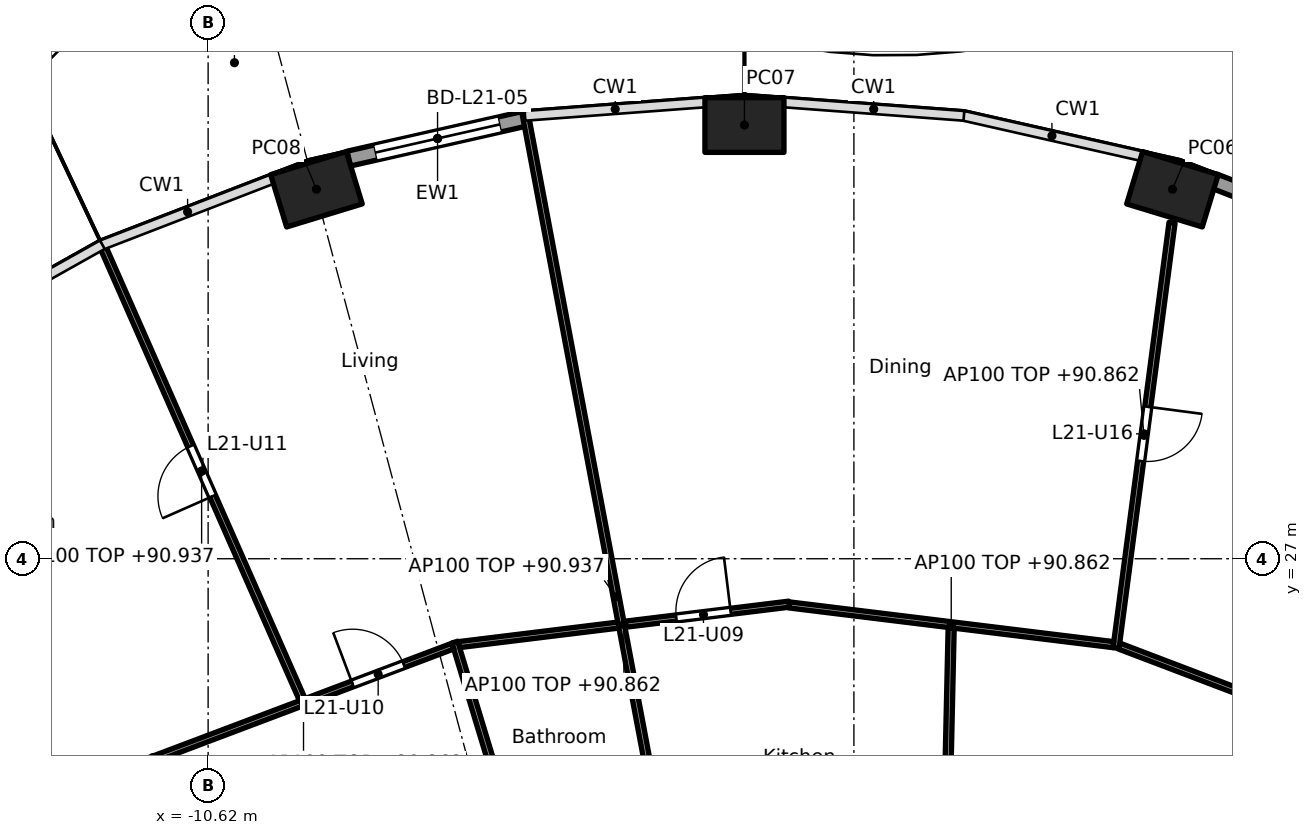
"""IFC4 building model, lengths in metres.
Left out: names, types, materials, properties, quantities, classifications, styles, units other than length and angle.
Written with IfcOpenShell. Run it as: python <this file> out.ifc"""

import sys

from ifc_helpers import new_model, si_unit, direction, frame, frame_2d, origin, origin_2d, place, context, subcontext, project, spatial, rectangle, hollow_rectangle, extrude, element, fill, save


model = new_model("IFC4")
c1 = context("Model", 3, precision=1e-05, world=origin(), true_north=direction((0.0, 1.0)))
c2 = subcontext(c1, "Body", "Model", "MODEL_VIEW")
j1 = project(units=[si_unit("LENGTHUNIT", "METRE"), si_unit("PLANEANGLEUNIT", "RADIAN")], contexts=[c1])
p1 = place(None, origin())
s1 = spatial("IfcSite", under=j1, at=p1, CompositionType="ELEMENT")
p2 = place(p1, origin())
s2 = spatial("IfcBuilding", under=s1, at=p2, CompositionType="ELEMENT")
p3 = place(p2, frame((0.0, 0.0, 88.1)))
s3 = spatial("IfcBuildingStorey", under=s2, at=p3, CompositionType="ELEMENT", Elevation=88.1)
for number, where, z_axis, x_axis in (
    (1, (5.239, 33.076, 0.0), (0.0, 0.0, 1.0), (-0.957, 0.292, 0.0)),
    (2, (-1.8, 34.133, 0.0), (0.0, 0.0, 1.0), (-1.0, 0.0, 0.0)),
    (3, (-8.839, 33.076, 0.0), (0.0, 0.0, 1.0), (-0.957, -0.292, 0.0)),
):
    element("IfcColumn", number, at=place(p3, frame(where, z_axis=z_axis, x_axis=x_axis)), inside=s3, PredefinedType="COLUMN", context=c2, shape_type="SweptSolid", body=[
        extrude(hollow_rectangle(XDim=1.3, YDim=0.9, WallThickness=0.045, at=origin_2d()), origin(), (0.0, 0.0, 1.0), 3.7),
    ])
p4 = place(p3, frame((5.929, 33.208, 0.0), z_axis=(0.0, 0.0, 1.0), x_axis=(0.932837560624, -0.360297218263, 0.0)))
e4 = element("IfcWall", 4, at=p4, inside=s3, PredefinedType="SOLIDWALL", context=c2, shape_type="SweptSolid", body=[
    extrude(rectangle(XDim=3.028, YDim=0.25, at=frame_2d((1.514, 0.0))), origin(), (0.0, 0.0, 1.0), 3.44),
])
p5 = place(p4, frame((0.464, 0.0, 0.0)))
e5 = element("IfcOpeningElement", 5, at=p5, cuts=e4, PredefinedType="OPENING", context=c2, shape_type="SweptSolid", body=[
    extrude(rectangle(XDim=2.1, YDim=2.4, at=frame_2d((1.05, 1.2))), frame((0.0, 0.135, 0.0), z_axis=(0.0, -1.0, 0.0), x_axis=(1.0, 0.0, 0.0)), (0.0, 0.0, 1.0), 0.27),
])
p6 = place(p3, frame((-8.306, 33.58, 0.0), z_axis=(0.0, 0.0, 1.0), x_axis=(0.975317607872, 0.220806620767, 0.0)))
e6 = element("IfcWall", 6, at=p6, inside=s3, PredefinedType="SOLIDWALL", context=c2, shape_type="SweptSolid", body=[
    extrude(rectangle(XDim=2.993, YDim=0.25, at=frame_2d((1.497, 0.0))), origin(), (0.0, 0.0, 1.0), 3.44),
])
p7 = place(p6, frame((0.447, 0.0, 0.0)))
e7 = element("IfcOpeningElement", 7, at=p7, cuts=e6, PredefinedType="OPENING", context=c2, shape_type="SweptSolid", body=[
    extrude(rectangle(XDim=2.1, YDim=2.4, at=frame_2d((1.05, 1.2))), frame((0.0, 0.135, 0.0), z_axis=(0.0, -1.0, 0.0), x_axis=(1.0, 0.0, 0.0)), (0.0, 0.0, 1.0), 0.27),
])
p8 = place(p3, frame((6.141, 14.829, 0.0), z_axis=(0.0, 0.0, 1.0), x_axis=(0.354477134193, 0.935064682968, 0.0)))
e8 = element("IfcWall", 8, at=p8, inside=s3, PredefinedType="PARTITIONING", context=c2, shape_type="SweptSolid", body=[
    extrude(rectangle(XDim=15.626, YDim=0.2, at=frame_2d((7.813, 0.0))), origin(), (0.0, 0.0, 1.0), 2.762),
])
p9 = place(p3, frame((9.379, 23.655, 0.0), z_axis=(0.0, 0.0, 1.0), x_axis=(-0.934613076136, 0.355666132653, 0.0)))
e9 = element("IfcWall", 9, at=p9, inside=s3, PredefinedType="PARTITIONING", context=c2, shape_type="SweptSolid", body=[
    extrude(rectangle(XDim=5.366, YDim=0.1, at=frame_2d((2.683, 0.0))), origin(), (0.0, 0.0, 1.0), 2.762),
])
p10 = place(p3, frame((4.311, 25.531, 0.0), z_axis=(0.0, 0.0, 1.0), x_axis=(0.130604008227, 0.991434613595, 0.0)))
e10 = element("IfcWall", 10, at=p10, inside=s3, PredefinedType="PARTITIONING", context=c2, shape_type="SweptSolid", body=[
    extrude(rectangle(XDim=7.055, YDim=0.1, at=frame_2d((3.527, 0.0))), origin(), (0.0, 0.0, 1.0), 2.762),
])
p11 = place(p10, frame((3.102, 0.0, 0.0)))
e11 = element("IfcOpeningElement", 11, at=p11, cuts=e10, PredefinedType="OPENING", context=c2, shape_type="SweptSolid", body=[
    extrude(rectangle(XDim=0.9, YDim=2.1, at=frame_2d((0.45, 1.05))), frame((0.0, 0.06, 0.0), z_axis=(0.0, -1.0, 0.0), x_axis=(1.0, 0.0, 0.0)), (0.0, 0.0, 1.0), 0.12),
])
p12 = place(p3, frame((4.267, 25.587, 0.0), z_axis=(0.0, 0.0, 1.0), x_axis=(-0.992576206119, 0.121624319302, 0.0)))
e12 = element("IfcWall", 12, at=p12, inside=s3, PredefinedType="PARTITIONING", context=c2, shape_type="SweptSolid", body=[
    extrude(rectangle(XDim=5.374, YDim=0.1, at=frame_2d((2.687, 0.0))), origin(), (0.0, 0.0, 1.0), 2.762),
])
p13 = place(p3, frame((1.303, 12.665, 0.0), z_axis=(0.0, 0.0, 1.0), x_axis=(0.022412244057, 0.999748814111, 0.0)))
e13 = element("IfcWall", 13, at=p13, inside=s3, PredefinedType="PARTITIONING", context=c2, shape_type="SweptSolid", body=[
    extrude(rectangle(XDim=13.203, YDim=0.1, at=frame_2d((6.601, 0.0))), origin(), (0.0, 0.0, 1.0), 2.687),
])
p14 = place(p13, frame((2.407, 0.0, 0.0)))
e14 = element("IfcOpeningElement", 14, at=p14, cuts=e13, PredefinedType="OPENING", context=c2, shape_type="SweptSolid", body=[
    extrude(rectangle(XDim=0.9, YDim=2.1, at=frame_2d((0.45, 1.05))), frame((0.0, 0.06, 0.0), z_axis=(0.0, -1.0, 0.0), x_axis=(1.0, 0.0, 0.0)), (0.0, 0.0, 1.0), 0.12),
])
p15 = place(p13, frame((9.009, 0.0, 0.0)))
e15 = element("IfcOpeningElement", 15, at=p15, cuts=e13, PredefinedType="OPENING", context=c2, shape_type="SweptSolid", body=[
    extrude(rectangle(XDim=0.9, YDim=2.1, at=frame_2d((0.45, 1.05))), frame((0.0, 0.06, 0.0), z_axis=(0.0, -1.0, 0.0), x_axis=(1.0, 0.0, 0.0)), (0.0, 0.0, 1.0), 0.12),
])
p16 = place(p3, frame((-1.066, 26.253, 0.0), z_axis=(0.0, 0.0, 1.0), x_axis=(-0.992574853421, -0.121635358166, 0.0)))
e16 = element("IfcWall", 16, at=p16, inside=s3, PredefinedType="PARTITIONING", context=c2, shape_type="SweptSolid", body=[
    extrude(rectangle(XDim=5.473, YDim=0.1, at=frame_2d((2.737, 0.0))), origin(), (0.0, 0.0, 1.0), 2.762),
])
p17 = place(p16, frame((0.969, 0.0, 0.0)))
e17 = element("IfcOpeningElement", 17, at=p17, cuts=e16, PredefinedType="OPENING", context=c2, shape_type="SweptSolid", body=[
    extrude(rectangle(XDim=0.9, YDim=2.1, at=frame_2d((0.45, 1.05))), frame((0.0, 0.06, 0.0), z_axis=(0.0, -1.0, 0.0), x_axis=(1.0, 0.0, 0.0)), (0.0, 0.0, 1.0), 0.12),
])
p18 = place(p3, frame((-2.413, 18.427, 0.0), z_axis=(0.0, 0.0, 1.0), x_axis=(-0.185126823719, 0.982714637695, 0.0)))
e18 = element("IfcWall", 18, at=p18, inside=s3, PredefinedType="PARTITIONING", context=c2, shape_type="SweptSolid", body=[
    extrude(rectangle(XDim=16.176, YDim=0.1, at=frame_2d((8.088, 0.0))), origin(), (0.0, 0.0, 1.0), 2.837),
])
p19 = place(p3, frame((-2.631, 12.66, 0.0), z_axis=(0.0, 0.0, 1.0), x_axis=(-0.290161396499, 0.956977723869, 0.0)))
e19 = element("IfcWall", 19, at=p19, inside=s3, PredefinedType="PARTITIONING", context=c2, shape_type="SweptSolid", body=[
    extrude(rectangle(XDim=13.552, YDim=0.1, at=frame_2d((6.776, 0.0))), origin(), (0.0, 0.0, 1.0), 2.687),
])
p20 = place(p19, frame((0.772, 0.0, 0.0)))
e20 = element("IfcOpeningElement", 20, at=p20, cuts=e19, PredefinedType="OPENING", context=c2, shape_type="SweptSolid", body=[
    extrude(rectangle(XDim=0.9, YDim=2.1, at=frame_2d((0.45, 1.05))), frame((0.0, 0.06, 0.0), z_axis=(0.0, -1.0, 0.0), x_axis=(1.0, 0.0, 0.0)), (0.0, 0.0, 1.0), 0.12),
])
p21 = place(p19, frame((9.212, 0.0, 0.0)))
e21 = element("IfcOpeningElement", 21, at=p21, cuts=e19, PredefinedType="OPENING", context=c2, shape_type="SweptSolid", body=[
    extrude(rectangle(XDim=0.9, YDim=2.1, at=frame_2d((0.45, 1.05))), frame((0.0, 0.06, 0.0), z_axis=(0.0, -1.0, 0.0), x_axis=(1.0, 0.0, 0.0)), (0.0, 0.0, 1.0), 0.12),
])
p22 = place(p3, frame((-6.596, 25.563, 0.0), z_axis=(0.0, 0.0, 1.0), x_axis=(-0.9356162121, -0.353018843201, 0.0)))
e22 = element("IfcWall", 22, at=p22, inside=s3, PredefinedType="PARTITIONING", context=c2, shape_type="SweptSolid", body=[
    extrude(rectangle(XDim=5.249, YDim=0.1, at=frame_2d((2.625, 0.0))), origin(), (0.0, 0.0, 1.0), 2.762),
])
p23 = place(p22, frame((0.862, 0.0, 0.0)))
e23 = element("IfcOpeningElement", 23, at=p23, cuts=e22, PredefinedType="OPENING", context=c2, shape_type="SweptSolid", body=[
    extrude(rectangle(XDim=0.9, YDim=2.1, at=frame_2d((0.45, 1.05))), frame((0.0, 0.06, 0.0), z_axis=(0.0, -1.0, 0.0), x_axis=(1.0, 0.0, 0.0)), (0.0, 0.0, 1.0), 0.12),
])
p24 = place(p3, frame((-9.072, 24.683, 0.0), z_axis=(0.0, 0.0, 1.0), x_axis=(-0.403192911159, 0.915115007194, 0.0)))
e24 = element("IfcWall", 24, at=p24, inside=s3, PredefinedType="PARTITIONING", context=c2, shape_type="SweptSolid", body=[
    extrude(rectangle(XDim=8.211, YDim=0.1, at=frame_2d((4.106, 0.0))), origin(), (0.0, 0.0, 1.0), 2.837),
])
p25 = place(p24, frame((3.656, 0.0, 0.0)))
e25 = element("IfcOpeningElement", 25, at=p25, cuts=e24, PredefinedType="OPENING", context=c2, shape_type="SweptSolid", body=[
    extrude(rectangle(XDim=0.9, YDim=2.1, at=frame_2d((0.45, 1.05))), frame((0.0, 0.06, 0.0), z_axis=(0.0, -1.0, 0.0), x_axis=(1.0, 0.0, 0.0)), (0.0, 0.0, 1.0), 0.12),
])
p26 = place(p7, origin())
e26 = element("IfcDoor", 26, at=p26, inside=s3, OperationType="SLIDING_TO_LEFT", PredefinedType="DOOR", context=c2, shape_type="SweptSolid", body=[
    extrude(rectangle(XDim=2.1, YDim=2.4, at=frame_2d((1.05, 1.2))), frame((0.0, 0.025, 0.0), z_axis=(0.0, -1.0, 0.0), x_axis=(1.0, 0.0, 0.0)), (0.0, 0.0, 1.0), 0.05),
])
fill(e7, e26)
p27 = place(p17, frame((0.9, 0.0, 0.0), x_axis=(-1.0, 0.0, 0.0)))
e27 = element("IfcDoor", 27, at=p27, inside=s3, OperationType="SINGLE_SWING_RIGHT", PredefinedType="DOOR", context=c2, shape_type="SweptSolid", body=[
    extrude(rectangle(XDim=0.9, YDim=2.1, at=frame_2d((0.45, 1.05))), frame((0.0, 0.025, 0.0), z_axis=(0.0, -1.0, 0.0), x_axis=(1.0, 0.0, 0.0)), (0.0, 0.0, 1.0), 0.05),
])
fill(e17, e27)
p28 = place(p23, frame((0.9, 0.0, 0.0), x_axis=(-1.0, 0.0, 0.0)))
e28 = element("IfcDoor", 28, at=p28, inside=s3, OperationType="SINGLE_SWING_LEFT", PredefinedType="DOOR", context=c2, shape_type="SweptSolid", body=[
    extrude(rectangle(XDim=0.9, YDim=2.1, at=frame_2d((0.45, 1.05))), frame((0.0, 0.025, 0.0), z_axis=(0.0, -1.0, 0.0), x_axis=(1.0, 0.0, 0.0)), (0.0, 0.0, 1.0), 0.05),
])
fill(e23, e28)
p29 = place(p25, origin())
e29 = element("IfcDoor", 29, at=p29, inside=s3, OperationType="SINGLE_SWING_LEFT", PredefinedType="DOOR", context=c2, shape_type="SweptSolid", body=[
    extrude(rectangle(XDim=0.9, YDim=2.1, at=frame_2d((0.45, 1.05))), frame((0.0, 0.025, 0.0), z_axis=(0.0, -1.0, 0.0), x_axis=(1.0, 0.0, 0.0)), (0.0, 0.0, 1.0), 0.05),
])
fill(e25, e29)
p30 = place(p11, frame((0.9, 0.0, 0.0), x_axis=(-1.0, 0.0, 0.0)))
e30 = element("IfcDoor", 30, at=p30, inside=s3, OperationType="SINGLE_SWING_LEFT", PredefinedType="DOOR", context=c2, shape_type="SweptSolid", body=[
    extrude(rectangle(XDim=0.9, YDim=2.1, at=frame_2d((0.45, 1.05))), frame((0.0, 0.025, 0.0), z_axis=(0.0, -1.0, 0.0), x_axis=(1.0, 0.0, 0.0)), (0.0, 0.0, 1.0), 0.05),
])
fill(e11, e30)
save(model, sys.argv[1])
